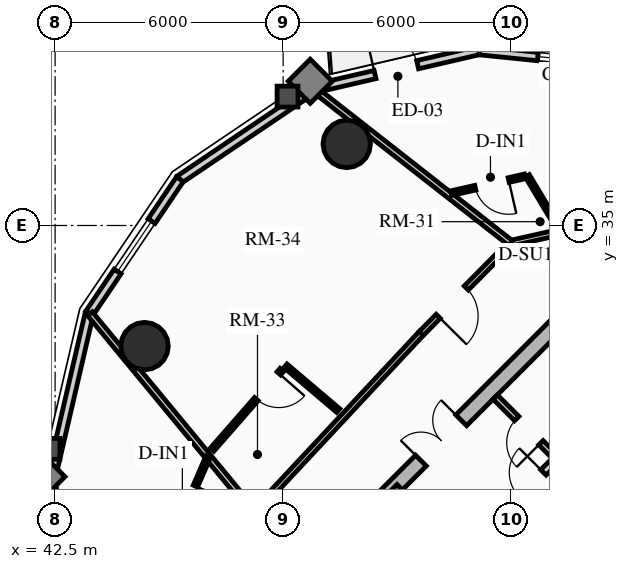
"""IFC4 building model, lengths in metres.
Left out: names, types, materials, properties, quantities, classifications, styles, units other than length and angle.
Written with IfcOpenShell. Run it as: python <this file> out.ifc"""

import sys

from ifc_helpers import new_model, si_unit, direction, frame, frame_2d, origin, origin_2d, place, context, subcontext, project, spatial, rectangle, circle, extrude, source, transform, mapped, element, fill, save


model = new_model("IFC4")
c1 = context("Model", 3, precision=1e-05, world=origin(), true_north=direction((0.0, 1.0)))
c2 = subcontext(c1, "Body", "Model", "MODEL_VIEW")
j1 = project(units=[si_unit("LENGTHUNIT", "METRE"), si_unit("PLANEANGLEUNIT", "RADIAN")], contexts=[c1])
p1 = place(None, origin())
s1 = spatial("IfcSite", under=j1, at=p1, CompositionType="ELEMENT")
p2 = place(p1, origin())
s2 = spatial("IfcBuilding", under=s1, at=p2, CompositionType="ELEMENT")
p3 = place(p2, frame((0.0, 0.0, 177.79)))
s3 = spatial("IfcBuildingStorey", under=s2, at=p3, CompositionType="ELEMENT", Elevation=177.79)
p4 = place(p3, frame((48.873, 25.561, 0.0), z_axis=(0.0, 0.0, 1.0), x_axis=(0.707106781187, 0.707106781187, 0.0)))
e1 = element("IfcWall", 1, at=p4, inside=s3, PredefinedType="SHEAR", context=c2, shape_type="SweptSolid", body=[
    extrude(rectangle(XDim=10.7, YDim=0.4, at=frame_2d((5.35, 0.0))), origin(), (0.0, 0.0, 1.0), 2.91),
])
m1 = source(origin(), c2, "Body", "SweptSolid", [
    extrude(rectangle(XDim=1.5, YDim=2.02, at=frame_2d((0.75, 1.01))), frame((0.0, 0.21, 0.0), z_axis=(0.0, -1.0, 0.0), x_axis=(1.0, 0.0, 0.0)), (0.0, 0.0, 1.0), 0.42),
])
p5 = place(p4, frame((4.6, 0.0, 0.0)))
e2 = element("IfcOpeningElement", 2, at=p5, cuts=e1, PredefinedType="OPENING", context=c2, shape_type="MappedRepresentation", body=[
    mapped(m1, transform((0.0, 0.0, 0.0), x_axis=(1.0, 0.0, 0.0), y_axis=(0.0, 1.0, 0.0), z_axis=(0.0, 0.0, 1.0), scale=1.0)),
])
p6 = place(p3, frame((61.06, 18.373, 0.0), z_axis=(0.0, 0.0, 1.0), x_axis=(-0.707106781187, 0.707106781187, 0.0)))
e3 = element("IfcWall", 3, at=p6, inside=s3, PredefinedType="SHEAR", context=c2, shape_type="SweptSolid", body=[
    extrude(rectangle(XDim=13.7, YDim=0.35, at=frame_2d((6.85, 0.0))), origin(), (0.0, 0.0, 1.0), 2.91),
])
m2 = source(origin(), c2, "Body", "SweptSolid", [
    extrude(rectangle(XDim=1.1, YDim=2.015, at=frame_2d((0.55, 1.007))), frame((0.0, 0.185, 0.0), z_axis=(0.0, -1.0, 0.0), x_axis=(1.0, 0.0, 0.0)), (0.0, 0.0, 1.0), 0.37),
])
p7 = place(p6, frame((4.85, 0.0, 0.0)))
e4 = element("IfcOpeningElement", 4, at=p7, cuts=e3, PredefinedType="OPENING", context=c2, shape_type="MappedRepresentation", body=[
    mapped(m2, transform((0.0, 0.0, 0.0), x_axis=(1.0, 0.0, 0.0), y_axis=(0.0, 1.0, 0.0), z_axis=(0.0, 0.0, 1.0), scale=1.0)),
])
p8 = place(p6, frame((0.625, 0.0, 0.0)))
e5 = element("IfcOpeningElement", 5, at=p8, cuts=e3, PredefinedType="OPENING", context=c2, shape_type="MappedRepresentation", body=[
    mapped(m2, transform((0.0, 0.0, 0.0), x_axis=(1.0, 0.0, 0.0), y_axis=(0.0, 1.0, 0.0), z_axis=(0.0, 0.0, 1.0), scale=1.0)),
])
p9 = place(p6, frame((2.625, 0.0, 0.0)))
e6 = element("IfcOpeningElement", 6, at=p9, cuts=e3, PredefinedType="OPENING", context=c2, shape_type="MappedRepresentation", body=[
    mapped(m2, transform((0.0, 0.0, 0.0), x_axis=(1.0, 0.0, 0.0), y_axis=(0.0, 1.0, 0.0), z_axis=(0.0, 0.0, 1.0), scale=1.0)),
])
m3 = source(origin(), c2, "Body", "SweptSolid", [
    extrude(rectangle(XDim=1.15, YDim=2.02, at=frame_2d((0.575, 1.01))), frame((0.0, 0.185, 0.0), z_axis=(0.0, -1.0, 0.0), x_axis=(1.0, 0.0, 0.0)), (0.0, 0.0, 1.0), 0.37),
])
p10 = place(p6, frame((7.27, 0.0, 0.0)))
e7 = element("IfcOpeningElement", 7, at=p10, cuts=e3, PredefinedType="OPENING", context=c2, shape_type="MappedRepresentation", body=[
    mapped(m3, transform((0.0, 0.0, 0.0), x_axis=(1.0, 0.0, 0.0), y_axis=(0.0, 1.0, 0.0), z_axis=(0.0, 0.0, 1.0), scale=1.0)),
])
for number, where, z_axis, x_axis in (
    (8, (50.173, 37.146, 0.0), (0.0, 0.0, 1.0), (1.0, 0.0, 0.0)),
    (9, (44.854, 31.827, 0.0), (0.0, 0.0, 1.0), (1.0, 0.0, 0.0)),
):
    element("IfcColumn", number, at=place(p3, frame(where, z_axis=z_axis, x_axis=x_axis)), inside=s3, PredefinedType="USERDEFINED", context=c2, shape_type="SweptSolid", body=[
        extrude(circle(Radius=0.625, at=origin_2d()), origin(), (0.0, 0.0, 1.0), 2.91),
    ])
p11 = place(p3, frame((53.645, 39.603, 0.0), z_axis=(0.0, 0.0, 1.0), x_axis=(0.994943283129, -0.100438356004, 0.0)))
e10 = element("IfcWall", 10, at=p11, inside=s3, PredefinedType="SOLIDWALL", context=c2, shape_type="SweptSolid", body=[
    extrude(rectangle(XDim=4.733, YDim=0.22, at=frame_2d((2.366, 0.0))), origin(), (0.0, 0.0, 1.0), 2.245),
])
m4 = source(origin(), c2, "Body", "SweptSolid", [
    extrude(rectangle(XDim=1.6, YDim=1.3, at=frame_2d((0.8, 0.65))), frame((0.0, 0.12, 0.0), z_axis=(0.0, -1.0, 0.0), x_axis=(1.0, 0.0, 0.0)), (0.0, 0.0, 1.0), 0.24),
])
p12 = place(p11, frame((1.566, 0.0, 0.65)))
e11 = element("IfcOpeningElement", 11, at=p12, cuts=e10, PredefinedType="OPENING", context=c2, shape_type="MappedRepresentation", body=[
    mapped(m4, transform((0.0, 0.0, 0.0), x_axis=(1.0, 0.0, 0.0), y_axis=(0.0, 1.0, 0.0), z_axis=(0.0, 0.0, 1.0), scale=1.0)),
])
p13 = place(p3, frame((49.313, 38.6, 0.0), z_axis=(0.0, 0.0, 1.0), x_axis=(0.97422620202, 0.22557328587, 0.0)))
e12 = element("IfcWall", 12, at=p13, inside=s3, PredefinedType="SOLIDWALL", context=c2, shape_type="SweptSolid", body=[
    extrude(rectangle(XDim=4.446, YDim=0.22, at=frame_2d((2.223, 0.0))), origin(), (0.0, 0.0, 1.0), 2.245),
])
m5 = source(origin(), c2, "Body", "SweptSolid", [
    extrude(rectangle(XDim=1.15, YDim=2.005, at=frame_2d((0.575, 1.002))), frame((0.0, 0.12, 0.0), z_axis=(0.0, -1.0, 0.0), x_axis=(1.0, 0.0, 0.0)), (0.0, 0.0, 1.0), 0.24),
])
p14 = place(p13, frame((1.648, 0.0, 0.0)))
e13 = element("IfcOpeningElement", 13, at=p14, cuts=e12, PredefinedType="OPENING", context=c2, shape_type="MappedRepresentation", body=[
    mapped(m5, transform((0.0, 0.0, 0.0), x_axis=(1.0, 0.0, 0.0), y_axis=(0.0, 1.0, 0.0), z_axis=(0.0, 0.0, 1.0), scale=1.0)),
])
p15 = place(p3, frame((45.783, 36.217, 0.0), z_axis=(0.0, 0.0, 1.0), x_axis=(0.828817439852, 0.55951912514, 0.0)))
e14 = element("IfcWall", 14, at=p15, inside=s3, PredefinedType="SOLIDWALL", context=c2, shape_type="SweptSolid", body=[
    extrude(rectangle(XDim=4.259, YDim=0.22, at=frame_2d((2.129, 0.0))), origin(), (0.0, 0.0, 1.0), 2.245),
])
p16 = place(p3, frame((43.4, 32.687, 0.0), z_axis=(0.0, 0.0, 1.0), x_axis=(0.55951912514, 0.828817439852, 0.0)))
e15 = element("IfcWall", 15, at=p16, inside=s3, PredefinedType="SOLIDWALL", context=c2, shape_type="SweptSolid", body=[
    extrude(rectangle(XDim=4.259, YDim=0.22, at=frame_2d((2.129, 0.0))), origin(), (0.0, 0.0, 1.0), 2.245),
])
p17 = place(p16, frame((1.33, 0.0, 0.65)))
e16 = element("IfcOpeningElement", 16, at=p17, cuts=e15, PredefinedType="OPENING", context=c2, shape_type="MappedRepresentation", body=[
    mapped(m4, transform((0.0, 0.0, 0.0), x_axis=(1.0, 0.0, 0.0), y_axis=(0.0, 1.0, 0.0), z_axis=(0.0, 0.0, 1.0), scale=1.0)),
])
p18 = place(p3, frame((42.397, 28.355, 0.0), z_axis=(0.0, 0.0, 1.0), x_axis=(0.22557328587, 0.97422620202, 0.0)))
e17 = element("IfcWall", 17, at=p18, inside=s3, PredefinedType="SOLIDWALL", context=c2, shape_type="SweptSolid", body=[
    extrude(rectangle(XDim=4.446, YDim=0.22, at=frame_2d((2.223, 0.0))), origin(), (0.0, 0.0, 1.0), 2.245),
])
p19 = place(p3, frame((42.873, 23.646, 0.0), z_axis=(0.0, 0.0, 1.0), x_axis=(-0.100438356004, 0.994943283129, 0.0)))
e18 = element("IfcWall", 18, at=p19, inside=s3, PredefinedType="SOLIDWALL", context=c2, shape_type="SweptSolid", body=[
    extrude(rectangle(XDim=4.733, YDim=0.22, at=frame_2d((2.366, 0.0))), origin(), (0.0, 0.0, 1.0), 2.245),
])
p20 = place(p19, frame((1.566, 0.0, 0.65)))
e19 = element("IfcOpeningElement", 19, at=p20, cuts=e18, PredefinedType="OPENING", context=c2, shape_type="MappedRepresentation", body=[
    mapped(m4, transform((0.0, 0.0, 0.0), x_axis=(1.0, 0.0, 0.0), y_axis=(0.0, 1.0, 0.0), z_axis=(0.0, 0.0, 1.0), scale=1.0)),
])
p21 = place(p3, frame((53.264, 26.416, 0.0), z_axis=(0.0, 0.0, 1.0), x_axis=(0.707106781187, 0.707106781187, 0.0)))
e20 = element("IfcWall", 20, at=p21, inside=s3, PredefinedType="PARTITIONING", context=c2, shape_type="SweptSolid", body=[
    extrude(rectangle(XDim=3.28, YDim=0.2, at=frame_2d((1.64, 0.0))), origin(), (0.0, 0.0, 1.0), 2.675),
])
m6 = source(origin(), c2, "Body", "SweptSolid", [
    extrude(rectangle(XDim=1.0, YDim=2.015, at=frame_2d((0.5, 1.007))), frame((0.0, 0.11, 0.0), z_axis=(0.0, -1.0, 0.0), x_axis=(1.0, 0.0, 0.0)), (0.0, 0.0, 1.0), 0.22),
])
p22 = place(p21, frame((0.14, 0.0, 0.0)))
e21 = element("IfcOpeningElement", 21, at=p22, cuts=e20, PredefinedType="OPENING", context=c2, shape_type="MappedRepresentation", body=[
    mapped(m6, transform((0.0, 0.0, 0.0), x_axis=(1.0, 0.0, 0.0), y_axis=(0.0, 1.0, 0.0), z_axis=(0.0, 0.0, 1.0), scale=1.0)),
])
m7 = source(origin(), c2, "Body", "SweptSolid", [
    extrude(rectangle(XDim=0.9, YDim=2.005, at=frame_2d((0.45, 1.002))), frame((0.0, 0.11, 0.0), z_axis=(0.0, -1.0, 0.0), x_axis=(1.0, 0.0, 0.0)), (0.0, 0.0, 1.0), 0.22),
])
p23 = place(p21, frame((2.05, 0.0, 0.0)))
e22 = element("IfcOpeningElement", 22, at=p23, cuts=e20, PredefinedType="OPENING", context=c2, shape_type="MappedRepresentation", body=[
    mapped(m7, transform((0.0, 0.0, 0.0), x_axis=(1.0, 0.0, 0.0), y_axis=(0.0, 1.0, 0.0), z_axis=(0.0, 0.0, 1.0), scale=1.0)),
])
p24 = place(p3, frame((56.839, 27.728, 0.0), z_axis=(0.0, 0.0, 1.0), x_axis=(-0.707106781187, 0.707106781187, 0.0)))
e23 = element("IfcWall", 23, at=p24, inside=s3, PredefinedType="PARTITIONING", context=c2, shape_type="SweptSolid", body=[
    extrude(rectangle(XDim=3.9, YDim=0.16, at=frame_2d((1.95, 0.0))), origin(), (0.0, 0.0, 1.0), 2.675),
])
m8 = source(origin(), c2, "Body", "SweptSolid", [
    extrude(rectangle(XDim=0.9, YDim=2.005, at=frame_2d((0.45, 1.002))), frame((0.0, 0.09, 0.0), z_axis=(0.0, -1.0, 0.0), x_axis=(1.0, 0.0, 0.0)), (0.0, 0.0, 1.0), 0.18),
])
p25 = place(p24, frame((2.2, 0.0, 0.0)))
e24 = element("IfcOpeningElement", 24, at=p25, cuts=e23, PredefinedType="OPENING", context=c2, shape_type="MappedRepresentation", body=[
    mapped(m8, transform((0.0, 0.0, 0.0), x_axis=(1.0, 0.0, 0.0), y_axis=(0.0, 1.0, 0.0), z_axis=(0.0, 0.0, 1.0), scale=1.0)),
])
p26 = place(p3, frame((56.025, 34.88, 0.0), z_axis=(0.0, 0.0, 1.0), x_axis=(-0.975729093394, -0.218981132301, 0.0)))
e25 = element("IfcWall", 25, at=p26, inside=s3, PredefinedType="PARTITIONING", context=c2, shape_type="SweptSolid", body=[
    extrude(rectangle(XDim=1.575, YDim=0.15, at=frame_2d((0.788, 0.0))), origin(), (0.0, 0.0, 1.0), 2.245),
])
p27 = place(p3, frame((54.488, 34.535, 0.0), z_axis=(0.0, 0.0, 1.0), x_axis=(-0.703666289339, -0.710530613871, 0.0)))
e26 = element("IfcWall", 26, at=p27, inside=s3, PredefinedType="PARTITIONING", context=c2, shape_type="SweptSolid", body=[
    extrude(rectangle(XDim=3.343, YDim=0.15, at=frame_2d((1.672, 0.0))), origin(), (0.0, 0.0, 1.0), 2.245),
])
m9 = source(origin(), c2, "Body", "SweptSolid", [
    extrude(rectangle(XDim=1.05, YDim=2.015, at=frame_2d((0.525, 1.007))), frame((0.0, 0.085, 0.0), z_axis=(0.0, -1.0, 0.0), x_axis=(1.0, 0.0, 0.0)), (0.0, 0.0, 1.0), 0.17),
])
p28 = place(p27, frame((1.66, 0.0, 0.0)))
e27 = element("IfcOpeningElement", 27, at=p28, cuts=e26, PredefinedType="OPENING", context=c2, shape_type="MappedRepresentation", body=[
    mapped(m9, transform((0.0, 0.0, 0.0), x_axis=(1.0, 0.0, 0.0), y_axis=(0.0, 1.0, 0.0), z_axis=(0.0, 0.0, 1.0), scale=1.0)),
])
p29 = place(p3, frame((52.135, 32.159, 0.0), z_axis=(0.0, 0.0, 1.0), x_axis=(-0.682546302454, -0.730842353047, 0.0)))
e28 = element("IfcWall", 28, at=p29, inside=s3, PredefinedType="PARTITIONING", context=c2, shape_type="SweptSolid", body=[
    extrude(rectangle(XDim=6.445, YDim=0.15, at=frame_2d((3.223, 0.0))), origin(), (0.0, 0.0, 1.0), 2.245),
])
p30 = place(p3, frame((54.488, 34.535, 0.0), z_axis=(0.0, 0.0, 1.0), x_axis=(-0.787155500995, 0.616754584298, 0.0)))
e29 = element("IfcWall", 29, at=p30, inside=s3, PredefinedType="PARTITIONING", context=c2, shape_type="SweptSolid", body=[
    extrude(rectangle(XDim=6.562, YDim=0.16, at=frame_2d((3.281, 0.0))), origin(), (0.0, 0.0, 1.0), 2.245),
])
p31 = place(p3, frame((47.736, 27.449, 0.0), z_axis=(0.0, 0.0, 1.0), x_axis=(-0.636785609289, 0.771040911886, 0.0)))
e30 = element("IfcWall", 30, at=p31, inside=s3, PredefinedType="PARTITIONING", context=c2, shape_type="SweptSolid", body=[
    extrude(rectangle(XDim=6.781, YDim=0.16, at=frame_2d((3.391, 0.0))), origin(), (0.0, 0.0, 1.0), 2.245),
])
p32 = place(p3, frame((55.727, 34.97, 0.0), z_axis=(0.0, 0.0, 1.0), x_axis=(-0.514518774568, 0.857479113808, 0.0)))
e31 = element("IfcWall", 31, at=p32, inside=s3, PredefinedType="PARTITIONING", context=c2, shape_type="SweptSolid", body=[
    extrude(rectangle(XDim=1.56, YDim=0.125, at=frame_2d((0.78, 0.0))), origin(), (0.0, 0.0, 1.0), 2.245),
])
p33 = place(p3, frame((54.864, 36.293, 0.0), z_axis=(0.0, 0.0, 1.0), x_axis=(-0.974875983782, -0.222748324896, 0.0)))
e32 = element("IfcWall", 32, at=p33, inside=s3, PredefinedType="PARTITIONING", context=c2, shape_type="SweptSolid", body=[
    extrude(rectangle(XDim=1.994, YDim=0.125, at=frame_2d((0.997, 0.0))), origin(), (0.0, 0.0, 1.0), 2.675),
])
m10 = source(origin(), c2, "Body", "SweptSolid", [
    extrude(rectangle(XDim=0.9, YDim=2.005, at=frame_2d((0.45, 1.002))), frame((0.0, 0.073, 0.0), z_axis=(0.0, -1.0, 0.0), x_axis=(1.0, 0.0, 0.0)), (0.0, 0.0, 1.0), 0.145),
])
p34 = place(p33, frame((0.44, 0.0, 0.0)))
e33 = element("IfcOpeningElement", 33, at=p34, cuts=e32, PredefinedType="OPENING", context=c2, shape_type="MappedRepresentation", body=[
    mapped(m10, transform((0.0, 0.0, 0.0), x_axis=(1.0, 0.0, 0.0), y_axis=(0.0, 1.0, 0.0), z_axis=(0.0, 0.0, 1.0), scale=1.0)),
])
p35 = place(p3, frame((49.949, 30.13, 0.0), z_axis=(0.0, 0.0, 1.0), x_axis=(-0.76253118385, 0.646951461592, 0.0)))
e34 = element("IfcWall", 34, at=p35, inside=s3, PredefinedType="PARTITIONING", context=c2, shape_type="SweptSolid", body=[
    extrude(rectangle(XDim=1.821, YDim=0.125, at=frame_2d((0.91, 0.0))), origin(), (0.0, 0.0, 1.0), 2.675),
])
p36 = place(p3, frame((48.465, 31.199, 0.0), z_axis=(0.0, 0.0, 1.0), x_axis=(-0.658113718436, -0.752918543805, 0.0)))
e35 = element("IfcWall", 35, at=p36, inside=s3, PredefinedType="PARTITIONING", context=c2, shape_type="SweptSolid", body=[
    extrude(rectangle(XDim=2.786, YDim=0.125, at=frame_2d((1.393, 0.0))), origin(), (0.0, 0.0, 1.0), 2.245),
])
p37 = place(p36, frame((0.12, 0.0, 0.0)))
e36 = element("IfcOpeningElement", 36, at=p37, cuts=e35, PredefinedType="OPENING", context=c2, shape_type="MappedRepresentation", body=[
    mapped(m10, transform((0.0, 0.0, 0.0), x_axis=(1.0, 0.0, 0.0), y_axis=(0.0, 1.0, 0.0), z_axis=(0.0, 0.0, 1.0), scale=1.0)),
])
p38 = place(p3, frame((46.527, 28.913, 0.0), z_axis=(0.0, 0.0, 1.0), x_axis=(-0.398002989165, -0.917384118358, 0.0)))
e37 = element("IfcWall", 37, at=p38, inside=s3, PredefinedType="PARTITIONING", context=c2, shape_type="SweptSolid", body=[
    extrude(rectangle(XDim=2.581, YDim=0.125, at=frame_2d((1.29, 0.0))), origin(), (0.0, 0.0, 1.0), 2.245),
])
p39 = place(p38, frame((0.84, 0.0, 0.0)))
e38 = element("IfcOpeningElement", 38, at=p39, cuts=e37, PredefinedType="OPENING", context=c2, shape_type="MappedRepresentation", body=[
    mapped(m10, transform((0.0, 0.0, 0.0), x_axis=(1.0, 0.0, 0.0), y_axis=(0.0, 1.0, 0.0), z_axis=(0.0, 0.0, 1.0), scale=1.0)),
])
m11 = source(origin(), c2, "Body", "SweptSolid", [
    extrude(rectangle(XDim=1.6, YDim=1.3, at=frame_2d((0.8, 0.65))), frame((0.0, 0.03, 0.0), z_axis=(0.0, -1.0, 0.0), x_axis=(1.0, 0.0, 0.0)), (0.0, 0.0, 1.0), 0.06),
])
p40 = place(p12, origin())
e39 = element("IfcWindow", 39, at=p40, inside=s3, PartitioningType="SINGLE_PANEL", PredefinedType="WINDOW", context=c2, shape_type="MappedRepresentation", body=[
    mapped(m11, transform((0.0, 0.0, 0.0), x_axis=(1.0, 0.0, 0.0), y_axis=(0.0, 1.0, 0.0), z_axis=(0.0, 0.0, 1.0), scale=1.0)),
])
fill(e11, e39)
m12 = source(origin(), c2, "Body", "SweptSolid", [
    extrude(rectangle(XDim=1.15, YDim=2.005, at=frame_2d((0.575, 1.002))), frame((0.0, 0.025, 0.0), z_axis=(0.0, -1.0, 0.0), x_axis=(1.0, 0.0, 0.0)), (0.0, 0.0, 1.0), 0.05),
])
p41 = place(p14, origin())
e40 = element("IfcDoor", 40, at=p41, inside=s3, OperationType="SINGLE_SWING_LEFT", PredefinedType="DOOR", context=c2, shape_type="MappedRepresentation", body=[
    mapped(m12, transform((0.0, 0.0, 0.0), x_axis=(1.0, 0.0, 0.0), y_axis=(0.0, 1.0, 0.0), z_axis=(0.0, 0.0, 1.0), scale=1.0)),
])
fill(e13, e40)
p42 = place(p17, origin())
e41 = element("IfcWindow", 41, at=p42, inside=s3, PartitioningType="SINGLE_PANEL", PredefinedType="WINDOW", context=c2, shape_type="MappedRepresentation", body=[
    mapped(m11, transform((0.0, 0.0, 0.0), x_axis=(1.0, 0.0, 0.0), y_axis=(0.0, 1.0, 0.0), z_axis=(0.0, 0.0, 1.0), scale=1.0)),
])
fill(e16, e41)
m13 = source(origin(), c2, "Body", "SweptSolid", [
    extrude(rectangle(XDim=1.5, YDim=2.02, at=frame_2d((0.75, 1.01))), frame((0.0, 0.025, 0.0), z_axis=(0.0, -1.0, 0.0), x_axis=(1.0, 0.0, 0.0)), (0.0, 0.0, 1.0), 0.05),
])
p43 = place(p5, origin())
e42 = element("IfcDoor", 42, at=p43, inside=s3, OperationType="DOUBLE_DOOR_SINGLE_SWING", PredefinedType="DOOR", context=c2, shape_type="MappedRepresentation", body=[
    mapped(m13, transform((0.0, 0.0, 0.0), x_axis=(1.0, 0.0, 0.0), y_axis=(0.0, 1.0, 0.0), z_axis=(0.0, 0.0, 1.0), scale=1.0)),
])
fill(e2, e42)
m14 = source(origin(), c2, "Body", "SweptSolid", [
    extrude(rectangle(XDim=0.9, YDim=2.005, at=frame_2d((0.45, 1.002))), frame((0.0, 0.025, 0.0), z_axis=(0.0, -1.0, 0.0), x_axis=(1.0, 0.0, 0.0)), (0.0, 0.0, 1.0), 0.05),
])
p44 = place(p23, origin())
e43 = element("IfcDoor", 43, at=p44, inside=s3, OperationType="SINGLE_SWING_RIGHT", PredefinedType="DOOR", context=c2, shape_type="MappedRepresentation", body=[
    mapped(m14, transform((0.0, 0.0, 0.0), x_axis=(1.0, 0.0, 0.0), y_axis=(0.0, 1.0, 0.0), z_axis=(0.0, 0.0, 1.0), scale=1.0)),
])
fill(e22, e43)
p45 = place(p25, origin())
e44 = element("IfcDoor", 44, at=p45, inside=s3, OperationType="SINGLE_SWING_LEFT", PredefinedType="DOOR", context=c2, shape_type="MappedRepresentation", body=[
    mapped(m14, transform((0.0, 0.0, 0.0), x_axis=(1.0, 0.0, 0.0), y_axis=(0.0, 1.0, 0.0), z_axis=(0.0, 0.0, 1.0), scale=1.0)),
])
fill(e24, e44)
p46 = place(p34, origin())
e45 = element("IfcDoor", 45, at=p46, inside=s3, OperationType="SINGLE_SWING_LEFT", PredefinedType="DOOR", context=c2, shape_type="MappedRepresentation", body=[
    mapped(m14, transform((0.0, 0.0, 0.0), x_axis=(1.0, 0.0, 0.0), y_axis=(0.0, 1.0, 0.0), z_axis=(0.0, 0.0, 1.0), scale=1.0)),
])
fill(e33, e45)
m15 = source(origin(), c2, "Body", "SweptSolid", [
    extrude(rectangle(XDim=1.05, YDim=2.015, at=frame_2d((0.525, 1.007))), frame((0.0, 0.025, 0.0), z_axis=(0.0, -1.0, 0.0), x_axis=(1.0, 0.0, 0.0)), (0.0, 0.0, 1.0), 0.05),
])
p47 = place(p28, origin())
e46 = element("IfcDoor", 46, at=p47, inside=s3, OperationType="SINGLE_SWING_RIGHT", PredefinedType="DOOR", context=c2, shape_type="MappedRepresentation", body=[
    mapped(m15, transform((0.0, 0.0, 0.0), x_axis=(1.0, 0.0, 0.0), y_axis=(0.0, 1.0, 0.0), z_axis=(0.0, 0.0, 1.0), scale=1.0)),
])
fill(e27, e46)
p48 = place(p37, origin())
e47 = element("IfcDoor", 47, at=p48, inside=s3, OperationType="SINGLE_SWING_LEFT", PredefinedType="DOOR", context=c2, shape_type="MappedRepresentation", body=[
    mapped(m14, transform((0.0, 0.0, 0.0), x_axis=(1.0, 0.0, 0.0), y_axis=(0.0, 1.0, 0.0), z_axis=(0.0, 0.0, 1.0), scale=1.0)),
])
fill(e36, e47)
p49 = place(p39, origin())
e48 = element("IfcDoor", 48, at=p49, inside=s3, OperationType="SINGLE_SWING_LEFT", PredefinedType="DOOR", context=c2, shape_type="MappedRepresentation", body=[
    mapped(m14, transform((0.0, 0.0, 0.0), x_axis=(1.0, 0.0, 0.0), y_axis=(0.0, 1.0, 0.0), z_axis=(0.0, 0.0, 1.0), scale=1.0)),
])
fill(e38, e48)
save(model, sys.argv[1])
